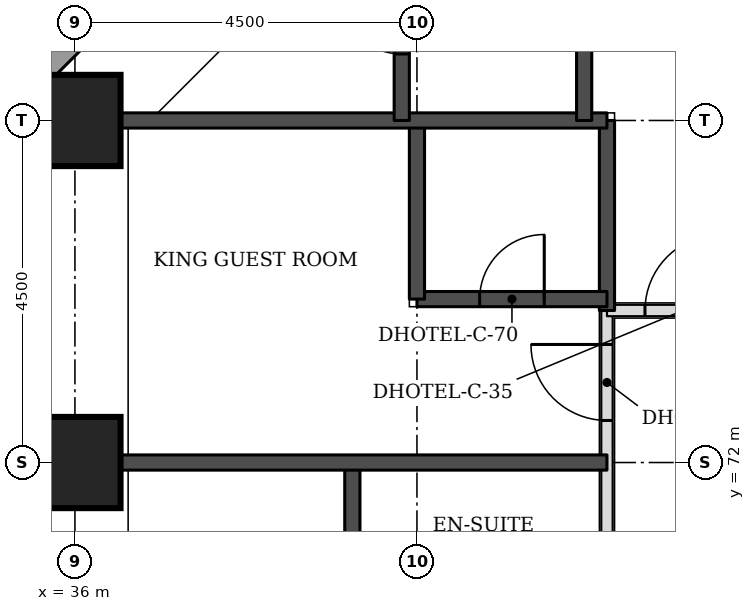
"""IFC4 building model, lengths in metres.
Left out: names, types, materials, properties, quantities, classifications, styles, units other than length and angle.
Written with IfcOpenShell. Run it as: python <this file> out.ifc"""

import sys

from ifc_helpers import new_model, si_unit, direction, frame, frame_2d, origin, origin_2d, place, context, subcontext, project, spatial, rectangle, extrude, element, fill, save


model = new_model("IFC4")
c1 = context("Model", 3, precision=1e-05, world=origin(), true_north=direction((0.0, 1.0)))
c2 = subcontext(c1, "Body", "Model", "MODEL_VIEW")
j1 = project(units=[si_unit("LENGTHUNIT", "METRE"), si_unit("PLANEANGLEUNIT", "RADIAN")], contexts=[c1])
p1 = place(None, origin())
s1 = spatial("IfcSite", under=j1, at=p1, CompositionType="ELEMENT")
p2 = place(p1, origin())
s2 = spatial("IfcBuilding", under=s1, at=p2, CompositionType="ELEMENT")
p3 = place(p2, frame((0.0, 0.0, 33.0)))
s3 = spatial("IfcBuildingStorey", under=s2, at=p3, CompositionType="ELEMENT", Elevation=33.0)
for number, where, z_axis, x_axis in (
    (1, (36.0, 72.0, 0.0), (0.0, 0.0, 1.0), (1.0, 0.0, 0.0)),
    (2, (36.0, 76.5, 0.0), (0.0, 0.0, 1.0), (1.0, 0.0, 0.0)),
):
    element("IfcColumn", number, at=place(p3, frame(where, z_axis=z_axis, x_axis=x_axis)), inside=s3, PredefinedType="COLUMN", context=c2, shape_type="SweptSolid", body=[
        extrude(rectangle(XDim=1.2, YDim=1.2, at=origin_2d()), origin(), (0.0, 0.0, 1.0), 3.3),
    ])
p4 = place(p3, frame((40.23, 81.826, 0.0), z_axis=(0.0, 0.0, 1.0), x_axis=(-0.707106781187, -0.707106781187, 0.0)))
e3 = element("IfcWall", 3, at=p4, inside=s3, PredefinedType="STANDARD", context=c2, shape_type="SweptSolid", body=[
    extrude(rectangle(XDim=7.151, YDim=0.35, at=frame_2d((3.576, 0.0))), origin(), (0.0, 0.0, 1.0), 3.055),
])
p5 = place(p4, frame((1.926, 0.0, 0.8)))
e4 = element("IfcOpeningElement", 4, at=p5, cuts=e3, PredefinedType="OPENING", context=c2, shape_type="SweptSolid", body=[
    extrude(rectangle(XDim=3.3, YDim=1.5, at=frame_2d((1.65, 0.75))), frame((0.0, 0.185, 0.0), z_axis=(0.0, -1.0, 0.0), x_axis=(1.0, 0.0, 0.0)), (0.0, 0.0, 1.0), 0.37),
])
p6 = place(p3, frame((43.0, 56.0, 0.0), z_axis=(0.0, 0.0, 1.0), x_axis=(0.0, 1.0, 0.0)))
e5 = element("IfcWall", 5, at=p6, inside=s3, PredefinedType="PARTITIONING", context=c2, shape_type="SweptSolid", body=[
    extrude(rectangle(XDim=18.0, YDim=0.15, at=frame_2d((9.0, 0.0))), origin(), (0.0, 0.0, 1.0), 3.08),
])
p7 = place(p6, frame((9.775, 0.0, 0.0)))
e6 = element("IfcOpeningElement", 6, at=p7, cuts=e5, PredefinedType="OPENING", context=c2, shape_type="SweptSolid", body=[
    extrude(rectangle(XDim=1.0, YDim=2.1, at=frame_2d((0.5, 1.05))), frame((0.0, 0.085, 0.0), z_axis=(0.0, -1.0, 0.0), x_axis=(1.0, 0.0, 0.0)), (0.0, 0.0, 1.0), 0.17),
])
p8 = place(p6, frame((16.553, 0.0, 0.0)))
e7 = element("IfcOpeningElement", 7, at=p8, cuts=e5, PredefinedType="OPENING", context=c2, shape_type="SweptSolid", body=[
    extrude(rectangle(XDim=1.0, YDim=2.1, at=frame_2d((0.5, 1.05))), frame((0.0, 0.085, 0.0), z_axis=(0.0, -1.0, 0.0), x_axis=(1.0, 0.0, 0.0)), (0.0, 0.0, 1.0), 0.17),
])
p9 = place(p6, frame((3.05, 0.0, 0.0)))
e8 = element("IfcOpeningElement", 8, at=p9, cuts=e5, PredefinedType="OPENING", context=c2, shape_type="SweptSolid", body=[
    extrude(rectangle(XDim=0.9, YDim=2.1, at=frame_2d((0.45, 1.05))), frame((0.0, 0.085, 0.0), z_axis=(0.0, -1.0, 0.0), x_axis=(1.0, 0.0, 0.0)), (0.0, 0.0, 1.0), 0.17),
])
p10 = place(p3, frame((43.0, 74.0, 0.0), z_axis=(0.0, 0.0, 1.0), x_axis=(1.0, 0.0, 0.0)))
e9 = element("IfcWall", 9, at=p10, inside=s3, PredefinedType="PARTITIONING", context=c2, shape_type="SweptSolid", body=[
    extrude(rectangle(XDim=26.5, YDim=0.15, at=frame_2d((13.25, 0.0))), origin(), (0.0, 0.0, 1.0), 3.08),
])
p11 = place(p10, frame((2.825, 0.0, 0.0)))
e10 = element("IfcOpeningElement", 10, at=p11, cuts=e9, PredefinedType="OPENING", context=c2, shape_type="SweptSolid", body=[
    extrude(rectangle(XDim=1.0, YDim=2.1, at=frame_2d((0.5, 1.05))), frame((0.0, 0.085, 0.0), z_axis=(0.0, -1.0, 0.0), x_axis=(1.0, 0.0, 0.0)), (0.0, 0.0, 1.0), 0.17),
])
p12 = place(p10, frame((9.425, 0.0, 0.0)))
e11 = element("IfcOpeningElement", 11, at=p12, cuts=e9, PredefinedType="OPENING", context=c2, shape_type="SweptSolid", body=[
    extrude(rectangle(XDim=1.0, YDim=2.1, at=frame_2d((0.5, 1.05))), frame((0.0, 0.085, 0.0), z_axis=(0.0, -1.0, 0.0), x_axis=(1.0, 0.0, 0.0)), (0.0, 0.0, 1.0), 0.17),
])
p13 = place(p10, frame((11.825, 0.0, 0.0)))
e12 = element("IfcOpeningElement", 12, at=p13, cuts=e9, PredefinedType="OPENING", context=c2, shape_type="SweptSolid", body=[
    extrude(rectangle(XDim=1.0, YDim=2.1, at=frame_2d((0.5, 1.05))), frame((0.0, 0.085, 0.0), z_axis=(0.0, -1.0, 0.0), x_axis=(1.0, 0.0, 0.0)), (0.0, 0.0, 1.0), 0.17),
])
p14 = place(p10, frame((18.425, 0.0, 0.0)))
e13 = element("IfcOpeningElement", 13, at=p14, cuts=e9, PredefinedType="OPENING", context=c2, shape_type="SweptSolid", body=[
    extrude(rectangle(XDim=1.0, YDim=2.1, at=frame_2d((0.5, 1.05))), frame((0.0, 0.085, 0.0), z_axis=(0.0, -1.0, 0.0), x_axis=(1.0, 0.0, 0.0)), (0.0, 0.0, 1.0), 0.17),
])
p15 = place(p10, frame((20.825, 0.0, 0.0)))
e14 = element("IfcOpeningElement", 14, at=p15, cuts=e9, PredefinedType="OPENING", context=c2, shape_type="SweptSolid", body=[
    extrude(rectangle(XDim=1.0, YDim=2.1, at=frame_2d((0.5, 1.05))), frame((0.0, 0.085, 0.0), z_axis=(0.0, -1.0, 0.0), x_axis=(1.0, 0.0, 0.0)), (0.0, 0.0, 1.0), 0.17),
])
p16 = place(p10, frame((0.5, 0.0, 0.0)))
e15 = element("IfcOpeningElement", 15, at=p16, cuts=e9, PredefinedType="OPENING", context=c2, shape_type="SweptSolid", body=[
    extrude(rectangle(XDim=1.0, YDim=2.1, at=frame_2d((0.5, 1.05))), frame((0.0, 0.085, 0.0), z_axis=(0.0, -1.0, 0.0), x_axis=(1.0, 0.0, 0.0)), (0.0, 0.0, 1.0), 0.17),
])
p17 = place(p10, frame((25.0, 0.0, 0.0)))
e16 = element("IfcOpeningElement", 16, at=p17, cuts=e9, PredefinedType="OPENING", context=c2, shape_type="SweptSolid", body=[
    extrude(rectangle(XDim=1.0, YDim=2.1, at=frame_2d((0.5, 1.05))), frame((0.0, 0.085, 0.0), z_axis=(0.0, -1.0, 0.0), x_axis=(1.0, 0.0, 0.0)), (0.0, 0.0, 1.0), 0.17),
])
p18 = place(p3, frame((39.65, 69.55, 0.0), z_axis=(0.0, 0.0, 1.0), x_axis=(0.0, 1.0, 0.0)))
e17 = element("IfcWall", 17, at=p18, inside=s3, PredefinedType="SOLIDWALL", context=c2, shape_type="SweptSolid", body=[
    extrude(rectangle(XDim=2.45, YDim=0.2, at=frame_2d((1.225, 0.0))), origin(), (0.0, 0.0, 1.0), 3.08),
])
p19 = place(p3, frame((36.6, 72.0, 0.0), z_axis=(0.0, 0.0, 1.0), x_axis=(1.0, 0.0, 0.0)))
e18 = element("IfcWall", 18, at=p19, inside=s3, PredefinedType="SOLIDWALL", context=c2, shape_type="SweptSolid", body=[
    extrude(rectangle(XDim=6.4, YDim=0.2, at=frame_2d((3.2, 0.0))), origin(), (0.0, 0.0, 1.0), 3.08),
])
p20 = place(p3, frame((43.0, 74.0, 0.0), z_axis=(0.0, 0.0, 1.0), x_axis=(0.0, 1.0, 0.0)))
e19 = element("IfcWall", 19, at=p20, inside=s3, PredefinedType="SOLIDWALL", context=c2, shape_type="SweptSolid", body=[
    extrude(rectangle(XDim=2.5, YDim=0.2, at=frame_2d((1.25, 0.0))), origin(), (0.0, 0.0, 1.0), 3.08),
])
p21 = place(p3, frame((40.5, 74.15, 0.0), z_axis=(0.0, 0.0, 1.0), x_axis=(1.0, 0.0, 0.0)))
e20 = element("IfcWall", 20, at=p21, inside=s3, PredefinedType="SOLIDWALL", context=c2, shape_type="SweptSolid", body=[
    extrude(rectangle(XDim=2.5, YDim=0.2, at=frame_2d((1.25, 0.0))), origin(), (0.0, 0.0, 1.0), 3.08),
])
p22 = place(p21, frame((0.825, 0.0, 0.0)))
e21 = element("IfcOpeningElement", 21, at=p22, cuts=e20, PredefinedType="OPENING", context=c2, shape_type="SweptSolid", body=[
    extrude(rectangle(XDim=0.85, YDim=2.1, at=frame_2d((0.425, 1.05))), frame((0.0, 0.11, 0.0), z_axis=(0.0, -1.0, 0.0), x_axis=(1.0, 0.0, 0.0)), (0.0, 0.0, 1.0), 0.22),
])
p23 = place(p3, frame((40.5, 74.15, 0.0), z_axis=(0.0, 0.0, 1.0), x_axis=(0.0, 1.0, 0.0)))
e22 = element("IfcWall", 22, at=p23, inside=s3, PredefinedType="SOLIDWALL", context=c2, shape_type="SweptSolid", body=[
    extrude(rectangle(XDim=2.35, YDim=0.2, at=frame_2d((1.175, 0.0))), origin(), (0.0, 0.0, 1.0), 3.08),
])
p24 = place(p3, frame((36.6, 76.5, 0.0), z_axis=(0.0, 0.0, 1.0), x_axis=(1.0, 0.0, 0.0)))
e23 = element("IfcWall", 23, at=p24, inside=s3, PredefinedType="SOLIDWALL", context=c2, shape_type="SweptSolid", body=[
    extrude(rectangle(XDim=6.4, YDim=0.2, at=frame_2d((3.2, 0.0))), origin(), (0.0, 0.0, 1.0), 3.08),
])
p25 = place(p3, frame((40.3, 76.5, 0.0), z_axis=(0.0, 0.0, 1.0), x_axis=(0.0, 1.0, 0.0)))
e24 = element("IfcWall", 24, at=p25, inside=s3, PredefinedType="SOLIDWALL", context=c2, shape_type="SweptSolid", body=[
    extrude(rectangle(XDim=2.5, YDim=0.2, at=frame_2d((1.25, 0.0))), origin(), (0.0, 0.0, 1.0), 3.08),
])
p26 = place(p25, frame((0.875, 0.0, 0.0)))
e25 = element("IfcOpeningElement", 25, at=p26, cuts=e24, PredefinedType="OPENING", context=c2, shape_type="SweptSolid", body=[
    extrude(rectangle(XDim=0.85, YDim=2.1, at=frame_2d((0.425, 1.05))), frame((0.0, 0.11, 0.0), z_axis=(0.0, -1.0, 0.0), x_axis=(1.0, 0.0, 0.0)), (0.0, 0.0, 1.0), 0.22),
])
p27 = place(p3, frame((42.7, 76.5, 0.0), z_axis=(0.0, 0.0, 1.0), x_axis=(0.0, 1.0, 0.0)))
e26 = element("IfcWall", 26, at=p27, inside=s3, PredefinedType="SOLIDWALL", context=c2, shape_type="SweptSolid", body=[
    extrude(rectangle(XDim=2.5, YDim=0.2, at=frame_2d((1.25, 0.0))), origin(), (0.0, 0.0, 1.0), 3.08),
])
p28 = place(p8, origin())
e27 = element("IfcDoor", 27, at=p28, inside=s3, OperationType="SINGLE_SWING_RIGHT", PredefinedType="DOOR", context=c2, shape_type="SweptSolid", body=[
    extrude(rectangle(XDim=1.0, YDim=2.1, at=frame_2d((0.5, 1.05))), frame((0.0, 0.025, 0.0), z_axis=(0.0, -1.0, 0.0), x_axis=(1.0, 0.0, 0.0)), (0.0, 0.0, 1.0), 0.05),
])
fill(e7, e27)
p29 = place(p22, origin())
e28 = element("IfcDoor", 28, at=p29, inside=s3, OperationType="SINGLE_SWING_RIGHT", PredefinedType="DOOR", context=c2, shape_type="SweptSolid", body=[
    extrude(rectangle(XDim=0.85, YDim=2.1, at=frame_2d((0.425, 1.05))), frame((0.0, 0.025, 0.0), z_axis=(0.0, -1.0, 0.0), x_axis=(1.0, 0.0, 0.0)), (0.0, 0.0, 1.0), 0.05),
])
fill(e21, e28)
p30 = place(p16, origin())
e29 = element("IfcDoor", 29, at=p30, inside=s3, OperationType="SINGLE_SWING_RIGHT", PredefinedType="DOOR", context=c2, shape_type="SweptSolid", body=[
    extrude(rectangle(XDim=1.0, YDim=2.1, at=frame_2d((0.5, 1.05))), frame((0.0, 0.025, 0.0), z_axis=(0.0, -1.0, 0.0), x_axis=(1.0, 0.0, 0.0)), (0.0, 0.0, 1.0), 0.05),
])
fill(e15, e29)
p31 = place(p26, origin())
e30 = element("IfcDoor", 30, at=p31, inside=s3, OperationType="SINGLE_SWING_RIGHT", PredefinedType="DOOR", context=c2, shape_type="SweptSolid", body=[
    extrude(rectangle(XDim=0.85, YDim=2.1, at=frame_2d((0.425, 1.05))), frame((0.0, 0.025, 0.0), z_axis=(0.0, -1.0, 0.0), x_axis=(1.0, 0.0, 0.0)), (0.0, 0.0, 1.0), 0.05),
])
fill(e25, e30)
save(model, sys.argv[1])
